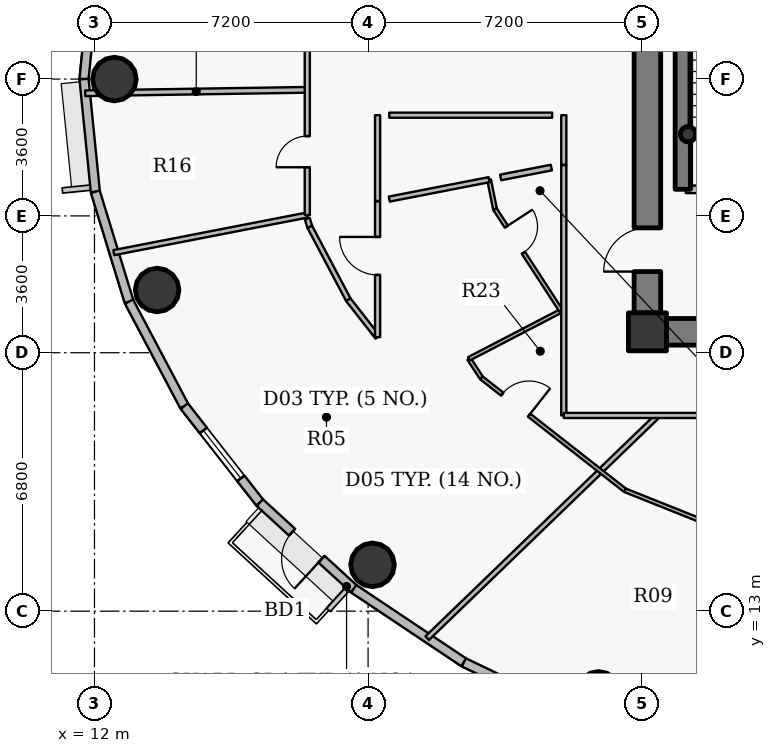
"""IFC4 building model, lengths in metres.
Left out: names, types, materials, properties, quantities, classifications, styles, units other than length and angle.
Written with IfcOpenShell. Run it as: python <this file> out.ifc"""

import sys

from ifc_helpers import new_model, si_unit, direction, frame, frame_2d, origin, origin_2d, place, context, subcontext, project, spatial, rectangle, hollow_circle, extrude, source, transform, mapped, element, fill, save


model = new_model("IFC4")
c1 = context("Model", 3, precision=1e-05, world=origin(), true_north=direction((0.0, 1.0)))
c2 = subcontext(c1, "Body", "Model", "MODEL_VIEW")
j1 = project(units=[si_unit("LENGTHUNIT", "METRE"), si_unit("PLANEANGLEUNIT", "RADIAN")], contexts=[c1])
p1 = place(None, origin())
s1 = spatial("IfcSite", under=j1, at=p1, CompositionType="ELEMENT")
p2 = place(p1, origin())
s2 = spatial("IfcBuilding", under=s1, at=p2, CompositionType="ELEMENT")
p3 = place(p2, frame((0.0, 0.0, 255.3)))
s3 = spatial("IfcBuildingStorey", under=s2, at=p3, CompositionType="ELEMENT", Elevation=255.3)
p4 = place(p3, frame((26.55, 20.35, 0.0), z_axis=(0.0, 0.0, 1.0), x_axis=(1.0, 0.0, 0.0)))
e1 = element("IfcColumn", 1, at=p4, inside=s3, PredefinedType="COLUMN", context=c2, shape_type="SweptSolid", body=[
    extrude(rectangle(XDim=1.0, YDim=1.0, at=origin_2d()), origin(), (0.0, 0.0, 1.0), 3.75),
])
p5 = place(p3, frame((27.48, 24.1, 0.0), z_axis=(0.0, 0.0, 1.0), x_axis=(0.0, 1.0, 0.0)))
e2 = element("IfcWall", 2, at=p5, inside=s3, PredefinedType="SHEAR", context=c2, shape_type="SweptSolid", body=[
    extrude(rectangle(XDim=8.6, YDim=0.4, at=frame_2d((4.3, 0.0))), origin(), (0.0, 0.0, 1.0), 3.75),
])
p6 = place(p3, frame((27.62, 25.55, 0.0), z_axis=(0.0, 0.0, 1.0), x_axis=(1.0, 0.0, 0.0)))
e3 = element("IfcColumn", 3, at=p6, inside=s3, PredefinedType="COLUMN", context=c2, shape_type="SweptSolid", body=[
    extrude(hollow_circle(Radius=0.203, WallThickness=0.016, at=origin_2d()), origin(), (0.0, 0.0, 1.0), 3.75),
])
p7 = place(p3, frame((44.95, 20.35, 0.0), z_axis=(0.0, 0.0, 1.0), x_axis=(-1.0, 0.0, 0.0)))
e4 = element("IfcWall", 4, at=p7, inside=s3, PredefinedType="SHEAR", context=c2, shape_type="SweptSolid", body=[
    extrude(rectangle(XDim=17.9, YDim=0.7, at=frame_2d((8.95, 0.0))), origin(), (0.0, 0.0, 1.0), 3.05),
])
p8 = place(p7, frame((9.7, 0.0, 0.0)))
e5 = element("IfcOpeningElement", 5, at=p8, cuts=e4, PredefinedType="OPENING", context=c2, shape_type="SweptSolid", body=[
    extrude(rectangle(XDim=1.15, YDim=2.15, at=origin_2d()), frame((0.575, 0.36, 1.075), z_axis=(0.0, -1.0, 0.0), x_axis=(1.0, 0.0, 0.0)), (0.0, 0.0, 1.0), 0.72),
])
p9 = place(p3, frame((26.55, 20.85, 0.0), z_axis=(0.0, 0.0, 1.0), x_axis=(0.0, 1.0, 0.0)))
e6 = element("IfcWall", 6, at=p9, inside=s3, PredefinedType="SHEAR", context=c2, shape_type="SweptSolid", body=[
    extrude(rectangle(XDim=12.3, YDim=0.7, at=frame_2d((6.15, 0.0))), origin(), (0.0, 0.0, 1.0), 3.05),
])
p10 = place(p9, frame((1.085, 0.0, 0.0)))
e7 = element("IfcOpeningElement", 7, at=p10, cuts=e6, PredefinedType="OPENING", context=c2, shape_type="SweptSolid", body=[
    extrude(rectangle(XDim=1.15, YDim=2.15, at=origin_2d()), frame((0.575, 0.36, 1.075), z_axis=(0.0, -1.0, 0.0), x_axis=(1.0, 0.0, 0.0)), (0.0, 0.0, 1.0), 0.72),
])
for number, where, z_axis, x_axis in (
    (8, (12.525, 27.0, 0.0), (0.0, 0.0, 1.0), (1.0, 0.0, 0.0)),
    (9, (13.649, 21.451, 0.0), (0.0, 0.0, 1.0), (1.0, 0.0, 0.0)),
    (10, (19.317, 14.219, 0.0), (0.0, 0.0, 1.0), (1.0, 0.0, 0.0)),
    (11, (25.265, 10.836, 0.0), (0.0, 0.0, 1.0), (1.0, 0.0, 0.0)),
):
    element("IfcColumn", number, at=place(p3, frame(where, z_axis=z_axis, x_axis=x_axis)), inside=s3, PredefinedType="COLUMN", context=c2, shape_type="SweptSolid", body=[
        extrude(hollow_circle(Radius=0.575, WallThickness=0.036, at=origin_2d()), origin(), (0.0, 0.0, 1.0), 3.75),
    ])
for number, where, z_axis, x_axis in (
    (12, (11.725, 27.0, 0.0), (0.0, 0.0, 1.0), (0.1, 0.995, 0.0)),
    (13, (12.023, 24.036, 0.0), (0.0, 0.0, 1.0), (-0.1, 0.995, 0.0)),
):
    element("IfcWall", number, at=place(p3, frame(where, z_axis=z_axis, x_axis=x_axis)), inside=s3, PredefinedType="SOLIDWALL", context=c2, shape_type="SweptSolid", body=[
        extrude(rectangle(XDim=2.979, YDim=0.24, at=frame_2d((1.489, 0.0))), origin(), (0.0, 0.0, 1.0), 3.5),
    ])
p11 = place(p3, frame((12.91, 21.144, 0.0), z_axis=(0.0, 0.0, 1.0), x_axis=(-0.293132907334, 0.95607170162, 0.0)))
e14 = element("IfcWall", 14, at=p11, inside=s3, PredefinedType="SOLIDWALL", context=c2, shape_type="SweptSolid", body=[
    extrude(rectangle(XDim=3.025, YDim=0.24, at=frame_2d((1.512, 0.0))), origin(), (0.0, 0.0, 1.0), 3.5),
])
p12 = place(p3, frame((14.364, 18.395, 0.0), z_axis=(0.0, 0.0, 1.0), x_axis=(-0.46766049993, 0.883908172157, 0.0)))
e15 = element("IfcWall", 15, at=p12, inside=s3, PredefinedType="SOLIDWALL", context=c2, shape_type="SweptSolid", body=[
    extrude(rectangle(XDim=3.11, YDim=0.24, at=frame_2d((1.555, 0.0))), origin(), (0.0, 0.0, 1.0), 3.5),
])
p13 = place(p3, frame((16.352, 15.855, 0.0), z_axis=(0.0, 0.0, 1.0), x_axis=(-0.616312344705, 0.787501805562, 0.0)))
e16 = element("IfcWall", 16, at=p13, inside=s3, PredefinedType="SOLIDWALL", context=c2, shape_type="SweptSolid", body=[
    extrude(rectangle(XDim=3.225, YDim=0.24, at=frame_2d((1.612, 0.0))), origin(), (0.0, 0.0, 1.0), 3.5),
])
p14 = place(p13, frame((0.812, 0.0, 0.9)))
e17 = element("IfcOpeningElement", 17, at=p14, cuts=e16, PredefinedType="OPENING", context=c2, shape_type="SweptSolid", body=[
    extrude(rectangle(XDim=1.6, YDim=1.75, at=origin_2d()), frame((0.8, 0.13, 0.875), z_axis=(0.0, -1.0, 0.0), x_axis=(1.0, 0.0, 0.0)), (0.0, 0.0, 1.0), 0.26),
])
p15 = place(p3, frame((18.824, 13.589, 0.0), z_axis=(0.0, 0.0, 1.0), x_axis=(-0.737123922599, 0.675757591694, 0.0)))
e18 = element("IfcWall", 18, at=p15, inside=s3, PredefinedType="SOLIDWALL", context=c2, shape_type="SweptSolid", body=[
    extrude(rectangle(XDim=3.354, YDim=0.24, at=frame_2d((1.677, 0.0))), origin(), (0.0, 0.0, 1.0), 3.5),
])
p16 = place(p15, frame((1.152, 0.0, 0.0)))
e19 = element("IfcOpeningElement", 19, at=p16, cuts=e18, PredefinedType="OPENING", context=c2, shape_type="SweptSolid", body=[
    extrude(rectangle(XDim=1.05, YDim=2.15, at=origin_2d()), frame((0.525, 0.13, 1.075), z_axis=(0.0, -1.0, 0.0), x_axis=(1.0, 0.0, 0.0)), (0.0, 0.0, 1.0), 0.26),
])
p17 = place(p3, frame((21.72, 11.652, 0.0), z_axis=(0.0, 0.0, 1.0), x_axis=(-0.831262496074, 0.555880079352, 0.0)))
e20 = element("IfcWall", 20, at=p17, inside=s3, PredefinedType="SOLIDWALL", context=c2, shape_type="SweptSolid", body=[
    extrude(rectangle(XDim=3.484, YDim=0.24, at=frame_2d((1.742, 0.0))), origin(), (0.0, 0.0, 1.0), 3.5),
])
p18 = place(p3, frame((24.969, 10.094, 0.0), z_axis=(0.0, 0.0, 1.0), x_axis=(-0.901598104751, 0.432574684313, 0.0)))
e21 = element("IfcWall", 21, at=p18, inside=s3, PredefinedType="SOLIDWALL", context=c2, shape_type="SweptSolid", body=[
    extrude(rectangle(XDim=3.604, YDim=0.24, at=frame_2d((1.802, 0.0))), origin(), (0.0, 0.0, 1.0), 3.5),
])
p19 = place(p3, frame((11.757, 26.628, 0.0), z_axis=(0.0, 0.0, 1.0), x_axis=(0.999882437841, 0.015333313333, 0.0)))
e22 = element("IfcWall", 22, at=p19, inside=s3, PredefinedType="PARTITIONING", context=c2, shape_type="SweptSolid", body=[
    extrude(rectangle(XDim=5.844, YDim=0.15, at=frame_2d((2.922, 0.0))), origin(), (0.0, 0.0, 1.0), 2.985),
])
p20 = place(p3, frame((12.509, 22.434, 0.0), z_axis=(0.0, 0.0, 1.0), x_axis=(0.981630821079, 0.190790280431, 0.0)))
e23 = element("IfcWall", 23, at=p20, inside=s3, PredefinedType="PARTITIONING", context=c2, shape_type="SweptSolid", body=[
    extrude(rectangle(XDim=5.186, YDim=0.135, at=frame_2d((2.593, 0.0))), origin(), (0.0, 0.0, 1.0), 2.985),
])
p21 = place(p3, frame((17.6, 23.328, 0.0), z_axis=(0.0, 0.0, 1.0), x_axis=(0.292875000845, -0.956150738053, 0.0)))
e24 = element("IfcWall", 24, at=p21, inside=s3, PredefinedType="PARTITIONING", context=c2, shape_type="SweptSolid", body=[
    extrude(rectangle(XDim=0.227, YDim=0.135, at=frame_2d((0.113, 0.0))), origin(), (0.0, 0.0, 1.0), 3.5),
])
p22 = place(p3, frame((17.6, 23.423, 0.0), z_axis=(0.0, 0.0, 1.0), x_axis=(0.0, 1.0, 0.0)))
e25 = element("IfcWall", 25, at=p22, inside=s3, PredefinedType="PARTITIONING", context=c2, shape_type="SweptSolid", body=[
    extrude(rectangle(XDim=4.527, YDim=0.135, at=frame_2d((2.263, 0.0))), origin(), (0.0, 0.0, 1.0), 2.935),
])
p23 = place(p22, frame((1.257, 0.0, 0.0)))
e26 = element("IfcOpeningElement", 26, at=p23, cuts=e25, PredefinedType="OPENING", context=c2, shape_type="SweptSolid", body=[
    extrude(rectangle(XDim=0.82, YDim=2.1, at=origin_2d()), frame((0.41, 0.078, 1.05), z_axis=(0.0, -1.0, 0.0), x_axis=(1.0, 0.0, 0.0)), (0.0, 0.0, 1.0), 0.155),
])
p24 = place(p3, frame((17.667, 23.111, 0.0), z_axis=(0.0, 0.0, 1.0), x_axis=(0.467675622269, -0.883900171024, 0.0)))
e27 = element("IfcWall", 27, at=p24, inside=s3, PredefinedType="PARTITIONING", context=c2, shape_type="SweptSolid", body=[
    extrude(rectangle(XDim=2.168, YDim=0.135, at=frame_2d((1.084, 0.0))), origin(), (0.0, 0.0, 1.0), 2.935),
])
p25 = place(p3, frame((18.681, 21.194, 0.0), z_axis=(0.0, 0.0, 1.0), x_axis=(0.616239706802, -0.787558647823, 0.0)))
e28 = element("IfcWall", 28, at=p25, inside=s3, PredefinedType="PARTITIONING", context=c2, shape_type="SweptSolid", body=[
    extrude(rectangle(XDim=1.248, YDim=0.135, at=frame_2d((0.624, 0.0))), origin(), (0.0, 0.0, 1.0), 3.5),
])
p26 = place(p3, frame((19.45, 20.211, 0.0), z_axis=(0.0, 0.0, 1.0), x_axis=(0.0, 1.0, 0.0)))
e29 = element("IfcWall", 29, at=p26, inside=s3, PredefinedType="PARTITIONING", context=c2, shape_type="SweptSolid", body=[
    extrude(rectangle(XDim=3.572, YDim=0.135, at=frame_2d((1.786, 0.0))), origin(), (0.0, 0.0, 1.0), 2.935),
])
p27 = place(p26, frame((1.636, 0.0, 0.0)))
e30 = element("IfcOpeningElement", 30, at=p27, cuts=e29, PredefinedType="OPENING", context=c2, shape_type="SweptSolid", body=[
    extrude(rectangle(XDim=1.0, YDim=2.15, at=origin_2d()), frame((0.5, 0.078, 1.075), z_axis=(0.0, -1.0, 0.0), x_axis=(1.0, 0.0, 0.0)), (0.0, 0.0, 1.0), 0.155),
])
p28 = place(p3, frame((20.756, 12.291, 0.0), z_axis=(0.0, 0.0, 1.0), x_axis=(0.719623273788, 0.694364705196, 0.0)))
e31 = element("IfcWall", 31, at=p28, inside=s3, PredefinedType="PARTITIONING", context=c2, shape_type="SweptSolid", body=[
    extrude(rectangle(XDim=8.438, YDim=0.135, at=frame_2d((4.219, 0.0))), origin(), (0.0, 0.0, 1.0), 2.985),
])
p29 = place(p3, frame((21.856, 19.641, 0.0), z_axis=(0.0, 0.0, 1.0), x_axis=(0.545246536912, -0.838275738636, 0.0)))
e32 = element("IfcWall", 32, at=p29, inside=s3, PredefinedType="PARTITIONING", context=c2, shape_type="SweptSolid", body=[
    extrude(rectangle(XDim=0.598, YDim=0.1, at=frame_2d((0.299, 0.0))), origin(), (0.0, 0.0, 1.0), 3.5),
])
p30 = place(p3, frame((21.856, 19.641, 0.0), z_axis=(0.0, 0.0, 1.0), x_axis=(0.887130502634, 0.461518657582, 0.0)))
e33 = element("IfcWall", 33, at=p30, inside=s3, PredefinedType="PARTITIONING", context=c2, shape_type="SweptSolid", body=[
    extrude(rectangle(XDim=2.733, YDim=0.1, at=frame_2d((1.367, 0.0))), origin(), (0.0, 0.0, 1.0), 3.5),
])
p31 = place(p3, frame((22.182, 19.139, 0.0), z_axis=(0.0, 0.0, 1.0), x_axis=(0.787386902975, -0.616459134917, 0.0)))
e34 = element("IfcWall", 34, at=p31, inside=s3, PredefinedType="PARTITIONING", context=c2, shape_type="SweptSolid", body=[
    extrude(rectangle(XDim=4.799, YDim=0.1, at=frame_2d((2.399, 0.0))), origin(), (0.0, 0.0, 1.0), 2.935),
])
p32 = place(p31, frame((0.695, 0.0, 0.0)))
e35 = element("IfcOpeningElement", 35, at=p32, cuts=e34, PredefinedType="OPENING", context=c2, shape_type="SweptSolid", body=[
    extrude(rectangle(XDim=0.9, YDim=2.1, at=origin_2d()), frame((0.45, 0.06, 1.05), z_axis=(0.0, -1.0, 0.0), x_axis=(1.0, 0.0, 0.0)), (0.0, 0.0, 1.0), 0.12),
])
p33 = place(p3, frame((22.383, 24.353, 0.0), z_axis=(0.0, 0.0, 1.0), x_axis=(0.198542560358, -0.980092266946, 0.0)))
e36 = element("IfcWall", 36, at=p33, inside=s3, PredefinedType="PARTITIONING", context=c2, shape_type="SweptSolid", body=[
    extrude(rectangle(XDim=0.793, YDim=0.1, at=frame_2d((0.396, 0.0))), origin(), (0.0, 0.0, 1.0), 2.935),
])
p34 = place(p3, frame((22.541, 23.576, 0.0), z_axis=(0.0, 0.0, 1.0), x_axis=(0.545375666154, -0.838191733893, 0.0)))
e37 = element("IfcWall", 37, at=p34, inside=s3, PredefinedType="PARTITIONING", context=c2, shape_type="SweptSolid", body=[
    extrude(rectangle(XDim=3.19, YDim=0.1, at=frame_2d((1.595, 0.0))), origin(), (0.0, 0.0, 1.0), 2.935),
])
p35 = place(p34, frame((0.546, 0.0, 0.0)))
e38 = element("IfcOpeningElement", 38, at=p35, cuts=e37, PredefinedType="OPENING", context=c2, shape_type="SweptSolid", body=[
    extrude(rectangle(XDim=0.82, YDim=2.1, at=origin_2d()), frame((0.41, 0.06, 1.05), z_axis=(0.0, -1.0, 0.0), x_axis=(1.0, 0.0, 0.0)), (0.0, 0.0, 1.0), 0.12),
])
p36 = place(p3, frame((24.35, 18.15, 0.0), z_axis=(0.0, 0.0, 1.0), x_axis=(0.0, 1.0, 0.0)))
e39 = element("IfcWall", 39, at=p36, inside=s3, PredefinedType="PARTITIONING", context=c2, shape_type="SweptSolid", body=[
    extrude(rectangle(XDim=6.585, YDim=0.135, at=frame_2d((3.293, 0.0))), origin(), (0.0, 0.0, 1.0), 2.935),
])
p37 = place(p3, frame((24.35, 18.15, 0.0), z_axis=(0.0, 0.0, 1.0), x_axis=(1.0, 0.0, 0.0)))
e40 = element("IfcWall", 40, at=p37, inside=s3, PredefinedType="PARTITIONING", context=c2, shape_type="SweptSolid", body=[
    extrude(rectangle(XDim=23.85, YDim=0.135, at=frame_2d((11.925, 0.0))), origin(), (0.0, 0.0, 1.0), 2.935),
])
p38 = place(p37, frame((6.069, 0.0, 0.0)))
e41 = element("IfcOpeningElement", 41, at=p38, cuts=e40, PredefinedType="OPENING", context=c2, shape_type="SweptSolid", body=[
    extrude(rectangle(XDim=1.0, YDim=2.15, at=origin_2d()), frame((0.5, 0.078, 1.075), z_axis=(0.0, -1.0, 0.0), x_axis=(1.0, 0.0, 0.0)), (0.0, 0.0, 1.0), 0.155),
])
p39 = place(p37, frame((19.505, 0.0, 0.0)))
e42 = element("IfcOpeningElement", 42, at=p39, cuts=e40, PredefinedType="OPENING", context=c2, shape_type="SweptSolid", body=[
    extrude(rectangle(XDim=1.0, YDim=2.15, at=origin_2d()), frame((0.5, 0.078, 1.075), z_axis=(0.0, -1.0, 0.0), x_axis=(1.0, 0.0, 0.0)), (0.0, 0.0, 1.0), 0.155),
])
p40 = place(p3, frame((25.961, 16.181, 0.0), z_axis=(0.0, 0.0, 1.0), x_axis=(0.928801505367, -0.370577608105, 0.0)))
e43 = element("IfcWall", 43, at=p40, inside=s3, PredefinedType="PARTITIONING", context=c2, shape_type="SweptSolid", body=[
    extrude(rectangle(XDim=5.126, YDim=0.1, at=frame_2d((2.563, 0.0))), origin(), (0.0, 0.0, 1.0), 2.935),
])
p41 = place(p3, frame((27.56, 24.1, 0.0), z_axis=(0.0, 0.0, 1.0), x_axis=(1.0, 0.0, 0.0)))
e44 = element("IfcWall", 44, at=p41, inside=s3, PredefinedType="PARTITIONING", context=c2, shape_type="SweptSolid", body=[
    extrude(rectangle(XDim=3.54, YDim=0.2, at=frame_2d((1.77, 0.0))), origin(), (0.0, 0.0, 1.0), 3.5),
])
p42 = place(p41, frame((1.17, 0.0, 0.0)))
e45 = element("IfcOpeningElement", 45, at=p42, cuts=e44, PredefinedType="OPENING", context=c2, shape_type="SweptSolid", body=[
    extrude(rectangle(XDim=1.2, YDim=2.15, at=origin_2d()), frame((0.6, 0.11, 1.075), z_axis=(0.0, -1.0, 0.0), x_axis=(1.0, 0.0, 0.0)), (0.0, 0.0, 1.0), 0.22),
])
p43 = place(p3, frame((19.45, 26.05, 0.0), z_axis=(0.0, 0.0, 1.0), x_axis=(0.0, -1.0, 0.0)))
e46 = element("IfcWall", 46, at=p43, inside=s3, PredefinedType="PARTITIONING", context=c2, shape_type="SweptSolid", body=[
    extrude(rectangle(XDim=2.257, YDim=0.135, at=frame_2d((1.128, 0.0))), origin(), (0.0, 0.0, 1.0), 3.5),
])
p44 = place(p3, frame((26.2, 20.84, 0.0), z_axis=(0.0, 0.0, 1.0), x_axis=(0.0, -1.0, 0.0)))
e47 = element("IfcWall", 47, at=p44, inside=s3, PredefinedType="PARTITIONING", context=c2, shape_type="SweptSolid", body=[
    extrude(rectangle(XDim=0.84, YDim=0.135, at=frame_2d((0.42, 0.0))), origin(), (0.0, 0.0, 1.0), 3.5),
])
p45 = place(p3, frame((26.508, 20.0, 0.0), z_axis=(0.0, 0.0, 1.0), x_axis=(1.0, 0.0, 0.0)))
e48 = element("IfcWall", 48, at=p45, inside=s3, PredefinedType="PARTITIONING", context=c2, shape_type="SweptSolid", body=[
    extrude(rectangle(XDim=0.532, YDim=0.135, at=frame_2d((0.266, 0.0))), origin(), (0.0, 0.0, 1.0), 2.935),
])
p46 = place(p3, frame((24.35, 24.745, 0.0), z_axis=(0.0, 0.0, 1.0), x_axis=(0.0, 1.0, 0.0)))
e49 = element("IfcWall", 49, at=p46, inside=s3, PredefinedType="PARTITIONING", context=c2, shape_type="SweptSolid", body=[
    extrude(rectangle(XDim=1.305, YDim=0.135, at=frame_2d((0.652, 0.0))), origin(), (0.0, 0.0, 1.0), 3.5),
])
p47 = place(p3, frame((24.042, 26.05, 0.0), z_axis=(0.0, 0.0, 1.0), x_axis=(-1.0, 0.0, 0.0)))
e50 = element("IfcWall", 50, at=p47, inside=s3, PredefinedType="PARTITIONING", context=c2, shape_type="SweptSolid", body=[
    extrude(rectangle(XDim=4.285, YDim=0.135, at=frame_2d((2.143, 0.0))), origin(), (0.0, 0.0, 1.0), 3.5),
])
p48 = place(p3, frame((22.688, 24.412, 0.0), z_axis=(0.0, 0.0, 1.0), x_axis=(0.981616324133, 0.19086485322, 0.0)))
e51 = element("IfcWall", 51, at=p48, inside=s3, PredefinedType="PARTITIONING", context=c2, shape_type="SweptSolid", body=[
    extrude(rectangle(XDim=1.36, YDim=0.15, at=frame_2d((0.68, 0.0))), origin(), (0.0, 0.0, 1.0), 3.5),
])
p49 = place(p3, frame((19.758, 23.843, 0.0), z_axis=(0.0, 0.0, 1.0), x_axis=(0.98161966457, 0.190847672582, 0.0)))
e52 = element("IfcWall", 52, at=p49, inside=s3, PredefinedType="PARTITIONING", context=c2, shape_type="SweptSolid", body=[
    extrude(rectangle(XDim=2.675, YDim=0.135, at=frame_2d((1.337, 0.0))), origin(), (0.0, 0.0, 1.0), 3.5),
])
m1 = source(origin(), c2, "Body", "SweptSolid", [
    extrude(rectangle(XDim=1.6, YDim=1.75, at=origin_2d()), frame((0.8, 0.03, 0.875), z_axis=(0.0, -1.0, 0.0), x_axis=(1.0, 0.0, 0.0)), (0.0, 0.0, 1.0), 0.06),
])
p50 = place(p14, origin())
e53 = element("IfcWindow", 53, at=p50, inside=s3, PartitioningType="DOUBLE_PANEL_VERTICAL", PredefinedType="WINDOW", context=c2, shape_type="MappedRepresentation", body=[
    mapped(m1, transform((0.0, 0.0, 0.0), x_axis=(1.0, 0.0, 0.0), y_axis=(0.0, 1.0, 0.0), z_axis=(0.0, 0.0, 1.0), scale=1.0)),
])
fill(e17, e53)
m2 = source(origin(), c2, "Body", "SweptSolid", [
    extrude(rectangle(XDim=1.05, YDim=2.15, at=origin_2d()), frame((0.525, 0.025, 1.075), z_axis=(0.0, -1.0, 0.0), x_axis=(1.0, 0.0, 0.0)), (0.0, 0.0, 1.0), 0.05),
])
p51 = place(p16, origin())
e54 = element("IfcDoor", 54, at=p51, inside=s3, OperationType="SINGLE_SWING_LEFT", PredefinedType="DOOR", context=c2, shape_type="MappedRepresentation", body=[
    mapped(m2, transform((0.0, 0.0, 0.0), x_axis=(1.0, 0.0, 0.0), y_axis=(0.0, 1.0, 0.0), z_axis=(0.0, 0.0, 1.0), scale=1.0)),
])
fill(e19, e54)
m3 = source(origin(), c2, "Body", "SweptSolid", [
    extrude(rectangle(XDim=1.15, YDim=2.15, at=origin_2d()), frame((0.575, 0.025, 1.075), z_axis=(0.0, -1.0, 0.0), x_axis=(1.0, 0.0, 0.0)), (0.0, 0.0, 1.0), 0.05),
])
p52 = place(p10, origin())
e55 = element("IfcDoor", 55, at=p52, inside=s3, OperationType="SINGLE_SWING_LEFT", PredefinedType="DOOR", context=c2, shape_type="MappedRepresentation", body=[
    mapped(m3, transform((0.0, 0.0, 0.0), x_axis=(1.0, 0.0, 0.0), y_axis=(0.0, 1.0, 0.0), z_axis=(0.0, 0.0, 1.0), scale=1.0)),
])
fill(e7, e55)
m4 = source(origin(), c2, "Body", "SweptSolid", [
    extrude(rectangle(XDim=1.0, YDim=2.15, at=origin_2d()), frame((0.5, 0.025, 1.075), z_axis=(0.0, -1.0, 0.0), x_axis=(1.0, 0.0, 0.0)), (0.0, 0.0, 1.0), 0.05),
])
p53 = place(p27, origin())
e56 = element("IfcDoor", 56, at=p53, inside=s3, OperationType="SINGLE_SWING_RIGHT", PredefinedType="DOOR", context=c2, shape_type="MappedRepresentation", body=[
    mapped(m4, transform((0.0, 0.0, 0.0), x_axis=(1.0, 0.0, 0.0), y_axis=(0.0, 1.0, 0.0), z_axis=(0.0, 0.0, 1.0), scale=1.0)),
])
fill(e30, e56)
m5 = source(origin(), c2, "Body", "SweptSolid", [
    extrude(rectangle(XDim=0.82, YDim=2.1, at=origin_2d()), frame((0.41, 0.025, 1.05), z_axis=(0.0, -1.0, 0.0), x_axis=(1.0, 0.0, 0.0)), (0.0, 0.0, 1.0), 0.05),
])
p54 = place(p35, origin())
e57 = element("IfcDoor", 57, at=p54, inside=s3, OperationType="SINGLE_SWING_LEFT", PredefinedType="DOOR", context=c2, shape_type="MappedRepresentation", body=[
    mapped(m5, transform((0.0, 0.0, 0.0), x_axis=(1.0, 0.0, 0.0), y_axis=(0.0, 1.0, 0.0), z_axis=(0.0, 0.0, 1.0), scale=1.0)),
])
fill(e38, e57)
m6 = source(origin(), c2, "Body", "SweptSolid", [
    extrude(rectangle(XDim=0.9, YDim=2.1, at=origin_2d()), frame((0.45, 0.025, 1.05), z_axis=(0.0, -1.0, 0.0), x_axis=(1.0, 0.0, 0.0)), (0.0, 0.0, 1.0), 0.05),
])
p55 = place(p32, origin())
e58 = element("IfcDoor", 58, at=p55, inside=s3, OperationType="SINGLE_SWING_RIGHT", PredefinedType="DOOR", context=c2, shape_type="MappedRepresentation", body=[
    mapped(m6, transform((0.0, 0.0, 0.0), x_axis=(1.0, 0.0, 0.0), y_axis=(0.0, 1.0, 0.0), z_axis=(0.0, 0.0, 1.0), scale=1.0)),
])
fill(e35, e58)
p56 = place(p23, origin())
e59 = element("IfcDoor", 59, at=p56, inside=s3, OperationType="SINGLE_SWING_LEFT", PredefinedType="DOOR", context=c2, shape_type="MappedRepresentation", body=[
    mapped(m5, transform((0.0, 0.0, 0.0), x_axis=(1.0, 0.0, 0.0), y_axis=(0.0, 1.0, 0.0), z_axis=(0.0, 0.0, 1.0), scale=1.0)),
])
fill(e26, e59)
save(model, sys.argv[1])
